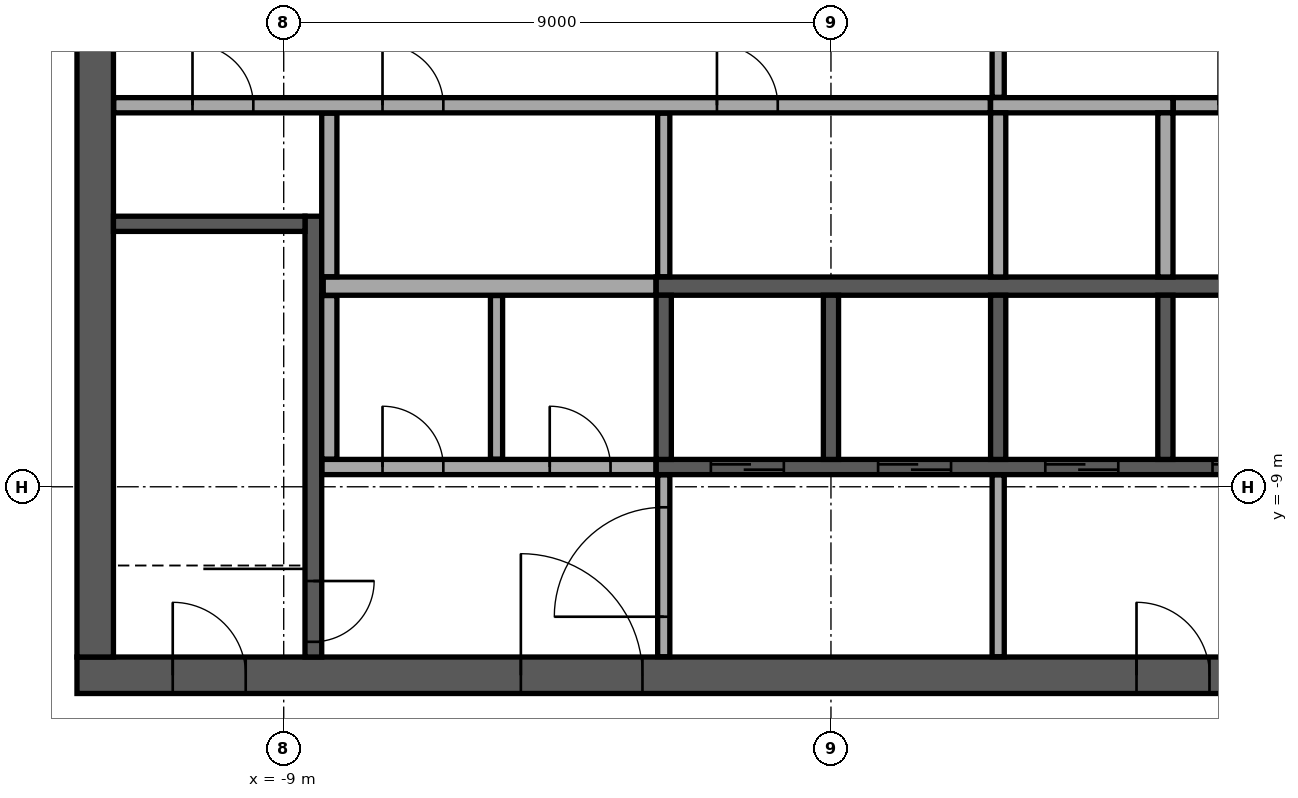
"""IFC4 building model, lengths in metres.
Left out: names, types, materials, properties, quantities, classifications, styles, units other than length and angle.
Written with IfcOpenShell. Run it as: python <this file> out.ifc"""

import sys

from ifc_helpers import new_model, si_unit, direction, frame, frame_2d, origin, place, context, subcontext, project, spatial, rectangle, extrude, element, fill, save


model = new_model("IFC4")
c1 = context("Model", 3, precision=1e-05, world=origin(), true_north=direction((0.0, 1.0)))
c2 = subcontext(c1, "Body", "Model", "MODEL_VIEW")
j1 = project(units=[si_unit("LENGTHUNIT", "METRE"), si_unit("PLANEANGLEUNIT", "RADIAN")], contexts=[c1])
p1 = place(None, origin())
s1 = spatial("IfcSite", under=j1, at=p1, CompositionType="ELEMENT")
p2 = place(p1, origin())
s2 = spatial("IfcBuilding", under=s1, at=p2, CompositionType="ELEMENT")
p3 = place(p2, frame((0.0, 0.0, 373.1)))
s3 = spatial("IfcBuildingStorey", under=s2, at=p3, CompositionType="ELEMENT", Elevation=373.1)
p4 = place(p3, frame((-12.4, -12.1, 0.0), z_axis=(0.0, 0.0, 1.0), x_axis=(1.0, 0.0, 0.0)))
e1 = element("IfcWall", 1, at=p4, inside=s3, PredefinedType="SHEAR", context=c2, shape_type="SweptSolid", body=[
    extrude(rectangle(XDim=24.8, YDim=0.6, at=frame_2d((12.4, 0.0))), origin(), (0.0, 0.0, 1.0), 3.2),
])
p5 = place(p4, frame((7.3, 0.0, 0.0)))
e2 = element("IfcOpeningElement", 2, at=p5, cuts=e1, PredefinedType="OPENING", context=c2, shape_type="SweptSolid", body=[
    extrude(rectangle(XDim=2.0, YDim=2.1, at=frame_2d((1.0, 1.05))), frame((0.0, 0.31, 0.0), z_axis=(0.0, -1.0, 0.0), x_axis=(1.0, 0.0, 0.0)), (0.0, 0.0, 1.0), 0.62),
])
p6 = place(p4, frame((17.425, 0.0, 0.0)))
e3 = element("IfcOpeningElement", 3, at=p6, cuts=e1, PredefinedType="OPENING", context=c2, shape_type="SweptSolid", body=[
    extrude(rectangle(XDim=1.2, YDim=2.1, at=frame_2d((0.6, 1.05))), frame((0.0, 0.31, 0.0), z_axis=(0.0, -1.0, 0.0), x_axis=(1.0, 0.0, 0.0)), (0.0, 0.0, 1.0), 0.62),
])
p7 = place(p4, frame((1.575, 0.0, 0.0)))
e4 = element("IfcOpeningElement", 4, at=p7, cuts=e1, PredefinedType="OPENING", context=c2, shape_type="SweptSolid", body=[
    extrude(rectangle(XDim=1.2, YDim=2.1, at=frame_2d((0.6, 1.05))), frame((0.0, 0.31, 0.0), z_axis=(0.0, -1.0, 0.0), x_axis=(1.0, 0.0, 0.0)), (0.0, 0.0, 1.0), 0.62),
])
p8 = place(p4, frame((22.025, 0.0, 0.0)))
e5 = element("IfcOpeningElement", 5, at=p8, cuts=e1, PredefinedType="OPENING", context=c2, shape_type="SweptSolid", body=[
    extrude(rectangle(XDim=1.2, YDim=2.1, at=frame_2d((0.6, 1.05))), frame((0.0, 0.31, 0.0), z_axis=(0.0, -1.0, 0.0), x_axis=(1.0, 0.0, 0.0)), (0.0, 0.0, 1.0), 0.62),
])
p9 = place(p3, frame((-12.1, -11.8, 0.0), z_axis=(0.0, 0.0, 1.0), x_axis=(0.0, 1.0, 0.0)))
e6 = element("IfcWall", 6, at=p9, inside=s3, PredefinedType="SHEAR", context=c2, shape_type="SweptSolid", body=[
    extrude(rectangle(XDim=23.6, YDim=0.6, at=frame_2d((11.8, 0.0))), origin(), (0.0, 0.0, 1.0), 3.2),
])
p10 = place(p9, frame((10.6, 0.0, 0.0)))
e7 = element("IfcOpeningElement", 7, at=p10, cuts=e6, PredefinedType="OPENING", context=c2, shape_type="SweptSolid", body=[
    extrude(rectangle(XDim=2.4, YDim=2.4, at=frame_2d((1.2, 1.2))), frame((0.0, 0.31, 0.0), z_axis=(0.0, -1.0, 0.0), x_axis=(1.0, 0.0, 0.0)), (0.0, 0.0, 1.0), 0.62),
])
p11 = place(p3, frame((-2.875, -5.7, 0.0), z_axis=(0.0, 0.0, 1.0), x_axis=(1.0, 0.0, 0.0)))
e8 = element("IfcWall", 8, at=p11, inside=s3, PredefinedType="SOLIDWALL", context=c2, shape_type="SweptSolid", body=[
    extrude(rectangle(XDim=11.25, YDim=0.3, at=frame_2d((5.625, 0.0))), origin(), (0.0, 0.0, 1.0), 3.2),
])
p12 = place(p3, frame((2.625, -2.725, 0.0), z_axis=(0.0, 0.0, 1.0), x_axis=(1.0, 0.0, 0.0)))
e9 = element("IfcWall", 9, at=p12, inside=s3, PredefinedType="SOLIDWALL", context=c2, shape_type="SweptSolid", body=[
    extrude(rectangle(XDim=3.0, YDim=0.25, at=frame_2d((1.5, 0.0))), origin(), (0.0, 0.0, 1.0), 3.2),
])
for number, where, z_axis, x_axis in (
    (10, (2.75, -5.55, 0.0), (0.0, 0.0, 1.0), (0.0, 1.0, 0.0)),
    (11, (5.5, -5.55, 0.0), (0.0, 0.0, 1.0), (0.0, 1.0, 0.0)),
):
    element("IfcWall", number, at=place(p3, frame(where, z_axis=z_axis, x_axis=x_axis)), inside=s3, PredefinedType="SOLIDWALL", context=c2, shape_type="SweptSolid", body=[
        extrude(rectangle(XDim=2.7, YDim=0.25, at=frame_2d((1.35, 0.0))), origin(), (0.0, 0.0, 1.0), 3.2),
    ])
p13 = place(p3, frame((-2.875, -8.675, 0.0), z_axis=(0.0, 0.0, 1.0), x_axis=(1.0, 0.0, 0.0)))
e12 = element("IfcWall", 12, at=p13, inside=s3, PredefinedType="SOLIDWALL", context=c2, shape_type="SweptSolid", body=[
    extrude(rectangle(XDim=11.25, YDim=0.25, at=frame_2d((5.625, 0.0))), origin(), (0.0, 0.0, 1.0), 3.2),
])
p14 = place(p13, frame((0.9, 0.0, 0.0)))
e13 = element("IfcOpeningElement", 13, at=p14, cuts=e12, PredefinedType="OPENING", context=c2, shape_type="SweptSolid", body=[
    extrude(rectangle(XDim=1.2, YDim=2.1, at=frame_2d((0.6, 1.05))), frame((0.0, 0.135, 0.0), z_axis=(0.0, -1.0, 0.0), x_axis=(1.0, 0.0, 0.0)), (0.0, 0.0, 1.0), 0.27),
])
p15 = place(p13, frame((3.65, 0.0, 0.0)))
e14 = element("IfcOpeningElement", 14, at=p15, cuts=e12, PredefinedType="OPENING", context=c2, shape_type="SweptSolid", body=[
    extrude(rectangle(XDim=1.2, YDim=2.1, at=frame_2d((0.6, 1.05))), frame((0.0, 0.135, 0.0), z_axis=(0.0, -1.0, 0.0), x_axis=(1.0, 0.0, 0.0)), (0.0, 0.0, 1.0), 0.27),
])
p16 = place(p13, frame((6.4, 0.0, 0.0)))
e15 = element("IfcOpeningElement", 15, at=p16, cuts=e12, PredefinedType="OPENING", context=c2, shape_type="SweptSolid", body=[
    extrude(rectangle(XDim=1.2, YDim=2.1, at=frame_2d((0.6, 1.05))), frame((0.0, 0.135, 0.0), z_axis=(0.0, -1.0, 0.0), x_axis=(1.0, 0.0, 0.0)), (0.0, 0.0, 1.0), 0.27),
])
p17 = place(p13, frame((9.15, 0.0, 0.0)))
e16 = element("IfcOpeningElement", 16, at=p17, cuts=e12, PredefinedType="OPENING", context=c2, shape_type="SweptSolid", body=[
    extrude(rectangle(XDim=1.2, YDim=2.1, at=frame_2d((0.6, 1.05))), frame((0.0, 0.135, 0.0), z_axis=(0.0, -1.0, 0.0), x_axis=(1.0, 0.0, 0.0)), (0.0, 0.0, 1.0), 0.27),
])
for number, where, z_axis, x_axis in (
    (17, (-2.75, -8.55, 0.0), (0.0, 0.0, 1.0), (0.0, 1.0, 0.0)),
    (18, (0.0, -8.55, 0.0), (0.0, 0.0, 1.0), (0.0, 1.0, 0.0)),
    (19, (2.75, -8.55, 0.0), (0.0, 0.0, 1.0), (0.0, 1.0, 0.0)),
    (20, (5.5, -8.55, 0.0), (0.0, 0.0, 1.0), (0.0, 1.0, 0.0)),
):
    element("IfcWall", number, at=place(p3, frame(where, z_axis=z_axis, x_axis=x_axis)), inside=s3, PredefinedType="SOLIDWALL", context=c2, shape_type="SweptSolid", body=[
        extrude(rectangle(XDim=2.7, YDim=0.25, at=frame_2d((1.35, 0.0))), origin(), (0.0, 0.0, 1.0), 3.2),
    ])
p18 = place(p3, frame((-8.512, -4.55, 0.0), z_axis=(0.0, 0.0, 1.0), x_axis=(0.0, -1.0, 0.0)))
e21 = element("IfcWall", 21, at=p18, inside=s3, PredefinedType="SOLIDWALL", context=c2, shape_type="SweptSolid", body=[
    extrude(rectangle(XDim=7.25, YDim=0.275, at=frame_2d((3.625, 0.0))), origin(), (0.0, 0.0, 1.0), 3.2),
])
p19 = place(p18, frame((6.0, 0.0, 0.0)))
e22 = element("IfcOpeningElement", 22, at=p19, cuts=e21, PredefinedType="OPENING", context=c2, shape_type="SweptSolid", body=[
    extrude(rectangle(XDim=1.0, YDim=2.1, at=frame_2d((0.5, 1.05))), frame((0.0, 0.147, 0.0), z_axis=(0.0, -1.0, 0.0), x_axis=(1.0, 0.0, 0.0)), (0.0, 0.0, 1.0), 0.295),
])
p20 = place(p3, frame((-8.65, -4.675, 0.0), z_axis=(0.0, 0.0, 1.0), x_axis=(-1.0, 0.0, 0.0)))
e23 = element("IfcWall", 23, at=p20, inside=s3, PredefinedType="SOLIDWALL", context=c2, shape_type="SweptSolid", body=[
    extrude(rectangle(XDim=3.15, YDim=0.25, at=frame_2d((1.575, 0.0))), origin(), (0.0, 0.0, 1.0), 3.2),
])
p21 = place(p3, frame((-2.75, -11.795, 0.0), z_axis=(0.0, 0.0, 1.0), x_axis=(0.0, 1.0, 0.0)))
e24 = element("IfcWall", 24, at=p21, inside=s3, PredefinedType="PARTITIONING", context=c2, shape_type="SweptSolid", body=[
    extrude(rectangle(XDim=2.99, YDim=0.2, at=frame_2d((1.495, 0.0))), origin(), (0.0, 0.0, 1.0), 3.2),
])
p22 = place(p21, frame((0.657, 0.0, 0.0)))
e25 = element("IfcOpeningElement", 25, at=p22, cuts=e24, PredefinedType="OPENING", context=c2, shape_type="SweptSolid", body=[
    extrude(rectangle(XDim=1.8, YDim=2.1, at=frame_2d((0.9, 1.05))), frame((0.0, 0.11, 0.0), z_axis=(0.0, -1.0, 0.0), x_axis=(1.0, 0.0, 0.0)), (0.0, 0.0, 1.0), 0.22),
])
p23 = place(p3, frame((2.75, -11.795, 0.0), z_axis=(0.0, 0.0, 1.0), x_axis=(0.0, 1.0, 0.0)))
e26 = element("IfcWall", 26, at=p23, inside=s3, PredefinedType="PARTITIONING", context=c2, shape_type="SweptSolid", body=[
    extrude(rectangle(XDim=2.99, YDim=0.2, at=frame_2d((1.495, 0.0))), origin(), (0.0, 0.0, 1.0), 3.2),
])
p24 = place(p3, frame((-8.37, -8.675, 0.0), z_axis=(0.0, 0.0, 1.0), x_axis=(1.0, 0.0, 0.0)))
e27 = element("IfcWall", 27, at=p24, inside=s3, PredefinedType="PARTITIONING", context=c2, shape_type="SweptSolid", body=[
    extrude(rectangle(XDim=5.49, YDim=0.25, at=frame_2d((2.745, 0.0))), origin(), (0.0, 0.0, 1.0), 3.2),
])
p25 = place(p24, frame((0.995, 0.0, 0.0)))
e28 = element("IfcOpeningElement", 28, at=p25, cuts=e27, PredefinedType="OPENING", context=c2, shape_type="SweptSolid", body=[
    extrude(rectangle(XDim=1.0, YDim=2.1, at=frame_2d((0.5, 1.05))), frame((0.0, 0.135, 0.0), z_axis=(0.0, -1.0, 0.0), x_axis=(1.0, 0.0, 0.0)), (0.0, 0.0, 1.0), 0.27),
])
p26 = place(p24, frame((3.745, 0.0, 0.0)))
e29 = element("IfcOpeningElement", 29, at=p26, cuts=e27, PredefinedType="OPENING", context=c2, shape_type="SweptSolid", body=[
    extrude(rectangle(XDim=1.0, YDim=2.1, at=frame_2d((0.5, 1.05))), frame((0.0, 0.135, 0.0), z_axis=(0.0, -1.0, 0.0), x_axis=(1.0, 0.0, 0.0)), (0.0, 0.0, 1.0), 0.27),
])
p27 = place(p3, frame((-8.25, -8.545, 0.0), z_axis=(0.0, 0.0, 1.0), x_axis=(0.0, 1.0, 0.0)))
e30 = element("IfcWall", 30, at=p27, inside=s3, PredefinedType="PARTITIONING", context=c2, shape_type="SweptSolid", body=[
    extrude(rectangle(XDim=2.69, YDim=0.25, at=frame_2d((1.345, 0.0))), origin(), (0.0, 0.0, 1.0), 3.2),
])
p28 = place(p3, frame((-5.5, -8.545, 0.0), z_axis=(0.0, 0.0, 1.0), x_axis=(0.0, 1.0, 0.0)))
e31 = element("IfcWall", 31, at=p28, inside=s3, PredefinedType="PARTITIONING", context=c2, shape_type="SweptSolid", body=[
    extrude(rectangle(XDim=2.69, YDim=0.2, at=frame_2d((1.345, 0.0))), origin(), (0.0, 0.0, 1.0), 3.2),
])
p29 = place(p3, frame((-8.35, -5.7, 0.0), z_axis=(0.0, 0.0, 1.0), x_axis=(1.0, 0.0, 0.0)))
e32 = element("IfcWall", 32, at=p29, inside=s3, PredefinedType="PARTITIONING", context=c2, shape_type="SweptSolid", body=[
    extrude(rectangle(XDim=5.47, YDim=0.3, at=frame_2d((2.735, 0.0))), origin(), (0.0, 0.0, 1.0), 3.2),
])
p30 = place(p3, frame((-8.25, -5.545, 0.0), z_axis=(0.0, 0.0, 1.0), x_axis=(0.0, 1.0, 0.0)))
e33 = element("IfcWall", 33, at=p30, inside=s3, PredefinedType="PARTITIONING", context=c2, shape_type="SweptSolid", body=[
    extrude(rectangle(XDim=2.69, YDim=0.25, at=frame_2d((1.345, 0.0))), origin(), (0.0, 0.0, 1.0), 3.2),
])
p31 = place(p3, frame((-2.75, -5.545, 0.0), z_axis=(0.0, 0.0, 1.0), x_axis=(0.0, 1.0, 0.0)))
e34 = element("IfcWall", 34, at=p31, inside=s3, PredefinedType="PARTITIONING", context=c2, shape_type="SweptSolid", body=[
    extrude(rectangle(XDim=2.69, YDim=0.2, at=frame_2d((1.345, 0.0))), origin(), (0.0, 0.0, 1.0), 3.2),
])
p32 = place(p3, frame((-11.795, -2.725, 0.0), z_axis=(0.0, 0.0, 1.0), x_axis=(1.0, 0.0, 0.0)))
e35 = element("IfcWall", 35, at=p32, inside=s3, PredefinedType="PARTITIONING", context=c2, shape_type="SweptSolid", body=[
    extrude(rectangle(XDim=14.415, YDim=0.25, at=frame_2d((7.208, 0.0))), origin(), (0.0, 0.0, 1.0), 3.2),
])
p33 = place(p32, frame((1.295, 0.0, 0.0)))
e36 = element("IfcOpeningElement", 36, at=p33, cuts=e35, PredefinedType="OPENING", context=c2, shape_type="SweptSolid", body=[
    extrude(rectangle(XDim=1.0, YDim=2.1, at=frame_2d((0.5, 1.05))), frame((0.0, 0.135, 0.0), z_axis=(0.0, -1.0, 0.0), x_axis=(1.0, 0.0, 0.0)), (0.0, 0.0, 1.0), 0.27),
])
p34 = place(p32, frame((4.42, 0.0, 0.0)))
e37 = element("IfcOpeningElement", 37, at=p34, cuts=e35, PredefinedType="OPENING", context=c2, shape_type="SweptSolid", body=[
    extrude(rectangle(XDim=1.0, YDim=2.1, at=frame_2d((0.5, 1.05))), frame((0.0, 0.135, 0.0), z_axis=(0.0, -1.0, 0.0), x_axis=(1.0, 0.0, 0.0)), (0.0, 0.0, 1.0), 0.27),
])
p35 = place(p32, frame((9.92, 0.0, 0.0)))
e38 = element("IfcOpeningElement", 38, at=p35, cuts=e35, PredefinedType="OPENING", context=c2, shape_type="SweptSolid", body=[
    extrude(rectangle(XDim=1.0, YDim=2.1, at=frame_2d((0.5, 1.05))), frame((0.0, 0.135, 0.0), z_axis=(0.0, -1.0, 0.0), x_axis=(1.0, 0.0, 0.0)), (0.0, 0.0, 1.0), 0.27),
])
p36 = place(p3, frame((5.63, -2.725, 0.0), z_axis=(0.0, 0.0, 1.0), x_axis=(1.0, 0.0, 0.0)))
e39 = element("IfcWall", 39, at=p36, inside=s3, PredefinedType="PARTITIONING", context=c2, shape_type="SweptSolid", body=[
    extrude(rectangle(XDim=6.165, YDim=0.25, at=frame_2d((3.083, 0.0))), origin(), (0.0, 0.0, 1.0), 3.2),
])
p37 = place(p36, frame((0.745, 0.0, 0.0)))
e40 = element("IfcOpeningElement", 40, at=p37, cuts=e39, PredefinedType="OPENING", context=c2, shape_type="SweptSolid", body=[
    extrude(rectangle(XDim=1.0, YDim=2.1, at=frame_2d((0.5, 1.05))), frame((0.0, 0.135, 0.0), z_axis=(0.0, -1.0, 0.0), x_axis=(1.0, 0.0, 0.0)), (0.0, 0.0, 1.0), 0.27),
])
p38 = place(p36, frame((3.92, 0.0, 0.0)))
e41 = element("IfcOpeningElement", 41, at=p38, cuts=e39, PredefinedType="OPENING", context=c2, shape_type="SweptSolid", body=[
    extrude(rectangle(XDim=0.9, YDim=2.1, at=frame_2d((0.45, 1.05))), frame((0.0, 0.135, 0.0), z_axis=(0.0, -1.0, 0.0), x_axis=(1.0, 0.0, 0.0)), (0.0, 0.0, 1.0), 0.27),
])
p39 = place(p3, frame((2.75, -2.595, 0.0), z_axis=(0.0, 0.0, 1.0), x_axis=(0.0, 1.0, 0.0)))
e42 = element("IfcWall", 42, at=p39, inside=s3, PredefinedType="PARTITIONING", context=c2, shape_type="SweptSolid", body=[
    extrude(rectangle(XDim=5.19, YDim=0.2, at=frame_2d((2.595, 0.0))), origin(), (0.0, 0.0, 1.0), 3.2),
])
p40 = place(p39, frame((1.395, 0.0, 0.0)))
e43 = element("IfcOpeningElement", 43, at=p40, cuts=e42, PredefinedType="OPENING", context=c2, shape_type="SweptSolid", body=[
    extrude(rectangle(XDim=2.4, YDim=2.4, at=frame_2d((1.2, 1.2))), frame((0.0, 0.11, 0.0), z_axis=(0.0, -1.0, 0.0), x_axis=(1.0, 0.0, 0.0)), (0.0, 0.0, 1.0), 0.22),
])
p41 = place(p5, origin())
e44 = element("IfcDoor", 44, at=p41, inside=s3, OperationType="SINGLE_SWING_LEFT", PredefinedType="DOOR", context=c2, shape_type="SweptSolid", body=[
    extrude(rectangle(XDim=2.0, YDim=2.1, at=frame_2d((1.0, 1.05))), frame((0.0, 0.025, 0.0), z_axis=(0.0, -1.0, 0.0), x_axis=(1.0, 0.0, 0.0)), (0.0, 0.0, 1.0), 0.05),
])
fill(e2, e44)
p42 = place(p6, origin())
e45 = element("IfcDoor", 45, at=p42, inside=s3, OperationType="SINGLE_SWING_LEFT", PredefinedType="DOOR", context=c2, shape_type="SweptSolid", body=[
    extrude(rectangle(XDim=1.2, YDim=2.1, at=frame_2d((0.6, 1.05))), frame((0.0, 0.025, 0.0), z_axis=(0.0, -1.0, 0.0), x_axis=(1.0, 0.0, 0.0)), (0.0, 0.0, 1.0), 0.05),
])
fill(e3, e45)
p43 = place(p7, origin())
e46 = element("IfcDoor", 46, at=p43, inside=s3, OperationType="SINGLE_SWING_LEFT", PredefinedType="DOOR", context=c2, shape_type="SweptSolid", body=[
    extrude(rectangle(XDim=1.2, YDim=2.1, at=frame_2d((0.6, 1.05))), frame((0.0, 0.025, 0.0), z_axis=(0.0, -1.0, 0.0), x_axis=(1.0, 0.0, 0.0)), (0.0, 0.0, 1.0), 0.05),
])
fill(e4, e46)
p44 = place(p14, origin())
e47 = element("IfcDoor", 47, at=p44, inside=s3, OperationType="DOUBLE_DOOR_SLIDING", PredefinedType="DOOR", context=c2, shape_type="SweptSolid", body=[
    extrude(rectangle(XDim=1.2, YDim=2.1, at=frame_2d((0.6, 1.05))), frame((0.0, 0.025, 0.0), z_axis=(0.0, -1.0, 0.0), x_axis=(1.0, 0.0, 0.0)), (0.0, 0.0, 1.0), 0.05),
])
fill(e13, e47)
p45 = place(p15, origin())
e48 = element("IfcDoor", 48, at=p45, inside=s3, OperationType="DOUBLE_DOOR_SLIDING", PredefinedType="DOOR", context=c2, shape_type="SweptSolid", body=[
    extrude(rectangle(XDim=1.2, YDim=2.1, at=frame_2d((0.6, 1.05))), frame((0.0, 0.025, 0.0), z_axis=(0.0, -1.0, 0.0), x_axis=(1.0, 0.0, 0.0)), (0.0, 0.0, 1.0), 0.05),
])
fill(e14, e48)
p46 = place(p16, origin())
e49 = element("IfcDoor", 49, at=p46, inside=s3, OperationType="DOUBLE_DOOR_SLIDING", PredefinedType="DOOR", context=c2, shape_type="SweptSolid", body=[
    extrude(rectangle(XDim=1.2, YDim=2.1, at=frame_2d((0.6, 1.05))), frame((0.0, 0.025, 0.0), z_axis=(0.0, -1.0, 0.0), x_axis=(1.0, 0.0, 0.0)), (0.0, 0.0, 1.0), 0.05),
])
fill(e15, e49)
p47 = place(p17, origin())
e50 = element("IfcDoor", 50, at=p47, inside=s3, OperationType="DOUBLE_DOOR_SLIDING", PredefinedType="DOOR", context=c2, shape_type="SweptSolid", body=[
    extrude(rectangle(XDim=1.2, YDim=2.1, at=frame_2d((0.6, 1.05))), frame((0.0, 0.025, 0.0), z_axis=(0.0, -1.0, 0.0), x_axis=(1.0, 0.0, 0.0)), (0.0, 0.0, 1.0), 0.05),
])
fill(e16, e50)
p48 = place(p19, origin())
e51 = element("IfcDoor", 51, at=p48, inside=s3, OperationType="SINGLE_SWING_LEFT", PredefinedType="DOOR", context=c2, shape_type="SweptSolid", body=[
    extrude(rectangle(XDim=1.0, YDim=2.1, at=frame_2d((0.5, 1.05))), frame((0.0, 0.025, 0.0), z_axis=(0.0, -1.0, 0.0), x_axis=(1.0, 0.0, 0.0)), (0.0, 0.0, 1.0), 0.05),
])
fill(e22, e51)
p49 = place(p25, origin())
e52 = element("IfcDoor", 52, at=p49, inside=s3, OperationType="SINGLE_SWING_RIGHT", PredefinedType="DOOR", context=c2, shape_type="SweptSolid", body=[
    extrude(rectangle(XDim=1.0, YDim=2.1, at=frame_2d((0.5, 1.05))), frame((0.0, 0.025, 0.0), z_axis=(0.0, -1.0, 0.0), x_axis=(1.0, 0.0, 0.0)), (0.0, 0.0, 1.0), 0.05),
])
fill(e28, e52)
p50 = place(p26, origin())
e53 = element("IfcDoor", 53, at=p50, inside=s3, OperationType="SINGLE_SWING_RIGHT", PredefinedType="DOOR", context=c2, shape_type="SweptSolid", body=[
    extrude(rectangle(XDim=1.0, YDim=2.1, at=frame_2d((0.5, 1.05))), frame((0.0, 0.025, 0.0), z_axis=(0.0, -1.0, 0.0), x_axis=(1.0, 0.0, 0.0)), (0.0, 0.0, 1.0), 0.05),
])
fill(e29, e53)
p51 = place(p33, origin())
e54 = element("IfcDoor", 54, at=p51, inside=s3, OperationType="SINGLE_SWING_RIGHT", PredefinedType="DOOR", context=c2, shape_type="SweptSolid", body=[
    extrude(rectangle(XDim=1.0, YDim=2.1, at=frame_2d((0.5, 1.05))), frame((0.0, 0.025, 0.0), z_axis=(0.0, -1.0, 0.0), x_axis=(1.0, 0.0, 0.0)), (0.0, 0.0, 1.0), 0.05),
])
fill(e36, e54)
p52 = place(p34, origin())
e55 = element("IfcDoor", 55, at=p52, inside=s3, OperationType="SINGLE_SWING_RIGHT", PredefinedType="DOOR", context=c2, shape_type="SweptSolid", body=[
    extrude(rectangle(XDim=1.0, YDim=2.1, at=frame_2d((0.5, 1.05))), frame((0.0, 0.025, 0.0), z_axis=(0.0, -1.0, 0.0), x_axis=(1.0, 0.0, 0.0)), (0.0, 0.0, 1.0), 0.05),
])
fill(e37, e55)
p53 = place(p35, origin())
e56 = element("IfcDoor", 56, at=p53, inside=s3, OperationType="SINGLE_SWING_RIGHT", PredefinedType="DOOR", context=c2, shape_type="SweptSolid", body=[
    extrude(rectangle(XDim=1.0, YDim=2.1, at=frame_2d((0.5, 1.05))), frame((0.0, 0.025, 0.0), z_axis=(0.0, -1.0, 0.0), x_axis=(1.0, 0.0, 0.0)), (0.0, 0.0, 1.0), 0.05),
])
fill(e38, e56)
p54 = place(p22, origin())
e57 = element("IfcDoor", 57, at=p54, inside=s3, OperationType="SINGLE_SWING_LEFT", PredefinedType="DOOR", context=c2, shape_type="SweptSolid", body=[
    extrude(rectangle(XDim=1.8, YDim=2.1, at=frame_2d((0.9, 1.05))), frame((0.0, 0.025, 0.0), z_axis=(0.0, -1.0, 0.0), x_axis=(1.0, 0.0, 0.0)), (0.0, 0.0, 1.0), 0.05),
])
fill(e25, e57)
save(model, sys.argv[1])
